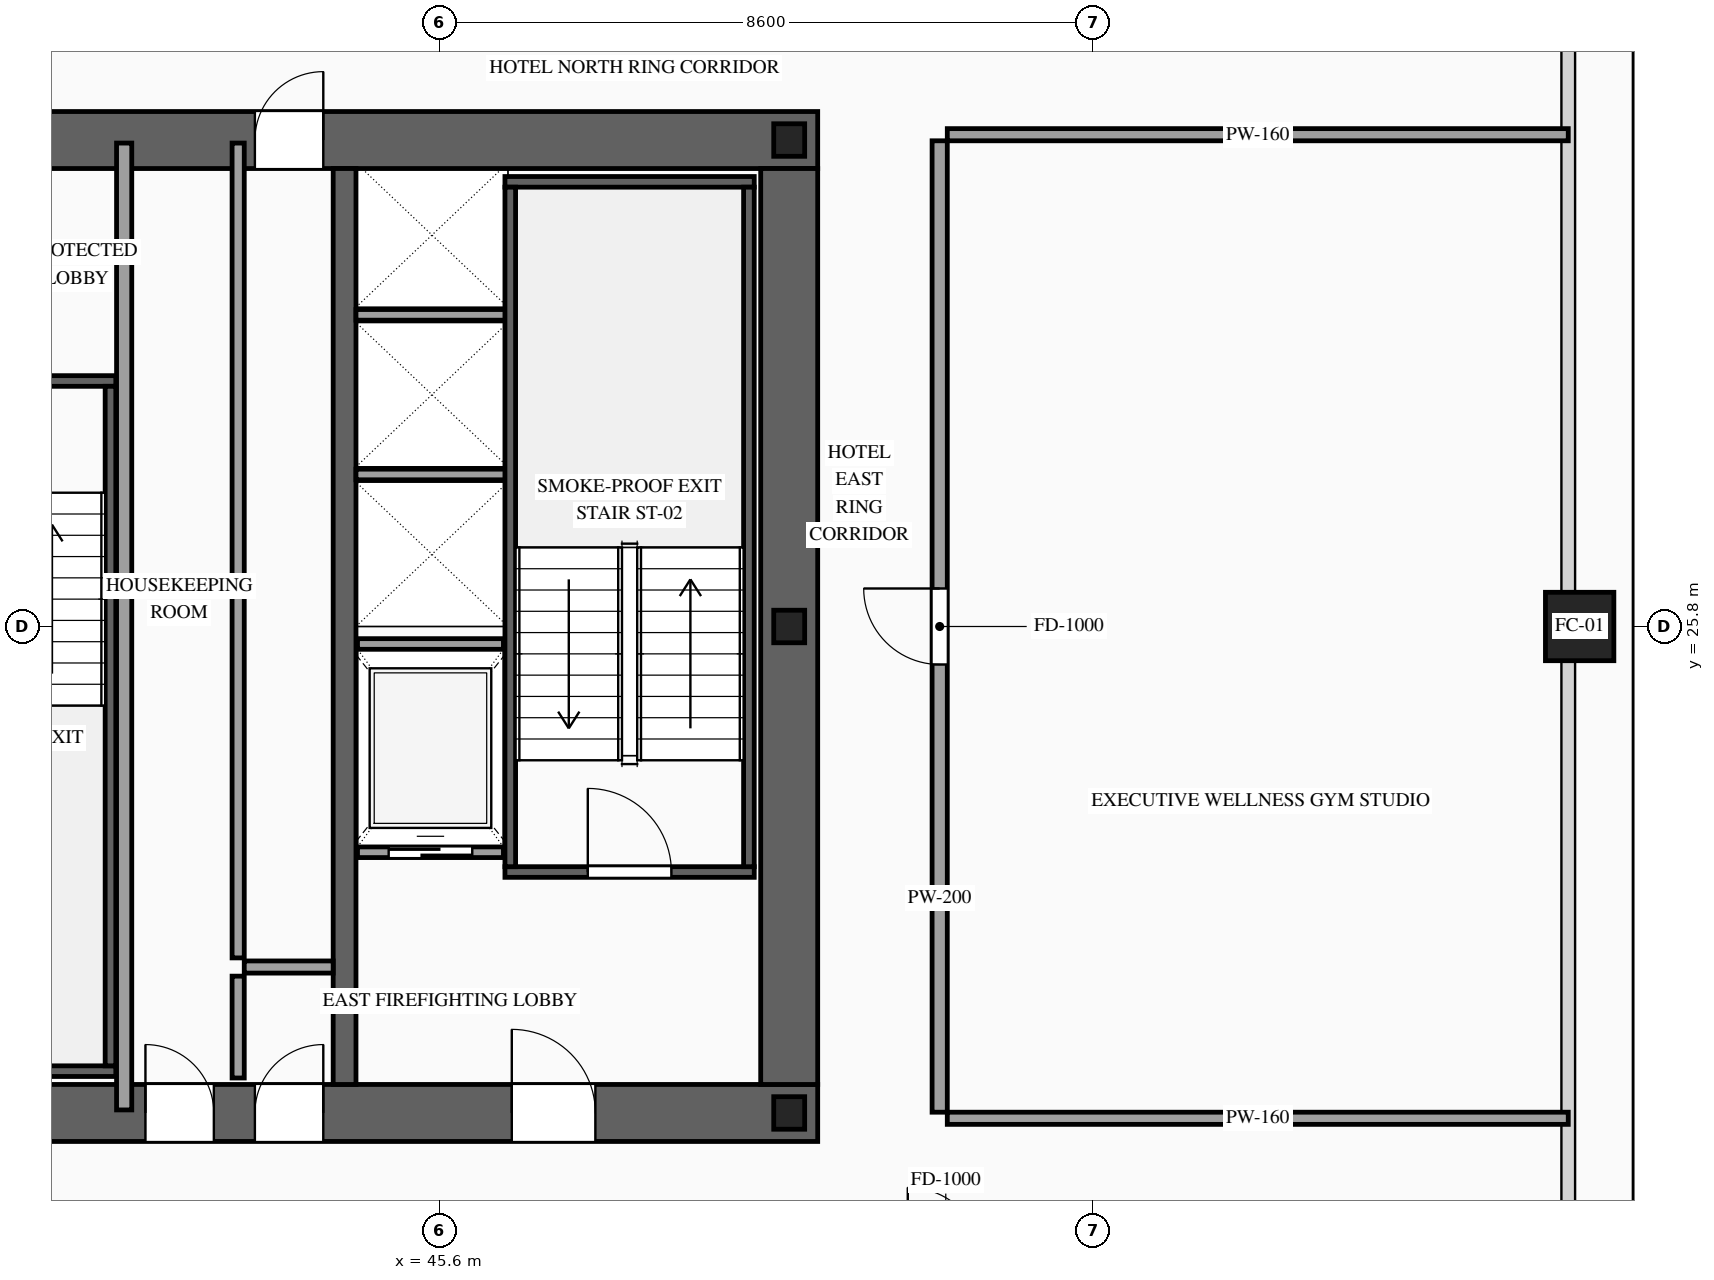
"""IFC4 building model, lengths in metres.
Left out: names, types, materials, properties, quantities, classifications, styles, units other than length and angle.
Written with IfcOpenShell. Run it as: python <this file> out.ifc"""

import sys

from ifc_helpers import new_model, si_unit, direction, frame, frame_2d, origin, origin_2d, place, context, subcontext, project, spatial, rectangle, hollow_rectangle, i_section, extrude, source, transform, mapped, element, fill, save


model = new_model("IFC4")
c1 = context("Model", 3, precision=1e-05, world=origin(), true_north=direction((0.0, 1.0)))
c2 = subcontext(c1, "Body", "Model", "MODEL_VIEW")
j1 = project(units=[si_unit("LENGTHUNIT", "METRE"), si_unit("PLANEANGLEUNIT", "RADIAN")], contexts=[c1])
p1 = place(None, origin())
s1 = spatial("IfcSite", under=j1, at=p1, CompositionType="ELEMENT")
p2 = place(p1, origin())
s2 = spatial("IfcBuilding", under=s1, at=p2, CompositionType="ELEMENT")
p3 = place(p2, frame((0.0, 0.0, 104.6)))
s3 = spatial("IfcBuildingStorey", under=s2, at=p3, CompositionType="ELEMENT", Elevation=104.6)
p4 = place(p3, frame((23.425, 19.4, 0.0), z_axis=(0.0, 0.0, 1.0), x_axis=(1.0, 0.0, 0.0)))
e1 = element("IfcWall", 1, at=p4, inside=s3, PredefinedType="SHEAR", context=c2, shape_type="SweptSolid", body=[
    extrude(rectangle(XDim=27.15, YDim=0.75, at=frame_2d((13.575, 0.0))), origin(), (0.0, 0.0, 1.0), 3.6),
])
p5 = place(p4, frame((2.025, 0.0, 0.0)))
e2 = element("IfcOpeningElement", 2, at=p5, cuts=e1, PredefinedType="OPENING", context=c2, shape_type="SweptSolid", body=[
    extrude(rectangle(XDim=1.1, YDim=2.2, at=frame_2d((0.55, 1.1))), frame((0.0, 0.39, 0.0), z_axis=(0.0, -1.0, 0.0), x_axis=(1.0, 0.0, 0.0)), (0.0, 0.0, 1.0), 0.78),
])
p6 = place(p4, frame((9.925, 0.0, 0.0)))
e3 = element("IfcOpeningElement", 3, at=p6, cuts=e1, PredefinedType="OPENING", context=c2, shape_type="SweptSolid", body=[
    extrude(rectangle(XDim=1.1, YDim=2.2, at=frame_2d((0.55, 1.1))), frame((0.0, 0.39, 0.0), z_axis=(0.0, -1.0, 0.0), x_axis=(1.0, 0.0, 0.0)), (0.0, 0.0, 1.0), 0.78),
])
p7 = place(p4, frame((23.125, 0.0, 0.0)))
e4 = element("IfcOpeningElement", 4, at=p7, cuts=e1, PredefinedType="OPENING", context=c2, shape_type="SweptSolid", body=[
    extrude(rectangle(XDim=1.1, YDim=2.2, at=frame_2d((0.55, 1.1))), frame((0.0, 0.39, 0.0), z_axis=(0.0, -1.0, 0.0), x_axis=(1.0, 0.0, 0.0)), (0.0, 0.0, 1.0), 0.78),
])
p8 = place(p4, frame((19.745, 0.0, 0.0)))
e5 = element("IfcOpeningElement", 5, at=p8, cuts=e1, PredefinedType="OPENING", context=c2, shape_type="SweptSolid", body=[
    extrude(rectangle(XDim=0.9, YDim=2.15, at=frame_2d((0.45, 1.075))), frame((0.0, 0.39, 0.0), z_axis=(0.0, -1.0, 0.0), x_axis=(1.0, 0.0, 0.0)), (0.0, 0.0, 1.0), 0.78),
])
p9 = place(p4, frame((18.305, 0.0, 0.0)))
e6 = element("IfcOpeningElement", 6, at=p9, cuts=e1, PredefinedType="OPENING", context=c2, shape_type="SweptSolid", body=[
    extrude(rectangle(XDim=0.9, YDim=2.15, at=frame_2d((0.45, 1.075))), frame((0.0, 0.39, 0.0), z_axis=(0.0, -1.0, 0.0), x_axis=(1.0, 0.0, 0.0)), (0.0, 0.0, 1.0), 0.78),
])
p10 = place(p3, frame((23.425, 32.2, 0.0), z_axis=(0.0, 0.0, 1.0), x_axis=(1.0, 0.0, 0.0)))
e7 = element("IfcWall", 7, at=p10, inside=s3, PredefinedType="SHEAR", context=c2, shape_type="SweptSolid", body=[
    extrude(rectangle(XDim=27.15, YDim=0.75, at=frame_2d((13.575, 0.0))), origin(), (0.0, 0.0, 1.0), 3.6),
])
p11 = place(p10, frame((4.645, 0.0, 0.0)))
e8 = element("IfcOpeningElement", 8, at=p11, cuts=e7, PredefinedType="OPENING", context=c2, shape_type="SweptSolid", body=[
    extrude(rectangle(XDim=0.9, YDim=2.15, at=frame_2d((0.45, 1.075))), frame((0.0, 0.39, 0.0), z_axis=(0.0, -1.0, 0.0), x_axis=(1.0, 0.0, 0.0)), (0.0, 0.0, 1.0), 0.78),
])
p12 = place(p10, frame((9.925, 0.0, 0.0)))
e9 = element("IfcOpeningElement", 9, at=p12, cuts=e7, PredefinedType="OPENING", context=c2, shape_type="SweptSolid", body=[
    extrude(rectangle(XDim=1.1, YDim=2.2, at=frame_2d((0.55, 1.1))), frame((0.0, 0.39, 0.0), z_axis=(0.0, -1.0, 0.0), x_axis=(1.0, 0.0, 0.0)), (0.0, 0.0, 1.0), 0.78),
])
p13 = place(p10, frame((15.775, 0.0, 0.0)))
e10 = element("IfcOpeningElement", 10, at=p13, cuts=e7, PredefinedType="OPENING", context=c2, shape_type="SweptSolid", body=[
    extrude(rectangle(XDim=1.1, YDim=2.2, at=frame_2d((0.55, 1.1))), frame((0.0, 0.39, 0.0), z_axis=(0.0, -1.0, 0.0), x_axis=(1.0, 0.0, 0.0)), (0.0, 0.0, 1.0), 0.78),
])
p14 = place(p10, frame((19.745, 0.0, 0.0)))
e11 = element("IfcOpeningElement", 11, at=p14, cuts=e7, PredefinedType="OPENING", context=c2, shape_type="SweptSolid", body=[
    extrude(rectangle(XDim=0.9, YDim=2.15, at=frame_2d((0.45, 1.075))), frame((0.0, 0.39, 0.0), z_axis=(0.0, -1.0, 0.0), x_axis=(1.0, 0.0, 0.0)), (0.0, 0.0, 1.0), 0.78),
])
m1 = source(origin(), c2, "Body", "SweptSolid", [
    extrude(rectangle(XDim=12.05, YDim=0.75, at=frame_2d((6.025, 0.0))), origin(), (0.0, 0.0, 1.0), 3.6),
])
p15 = place(p3, frame((50.2, 19.775, 0.0), z_axis=(0.0, 0.0, 1.0), x_axis=(0.0, 1.0, 0.0)))
e12 = element("IfcWall", 12, at=p15, inside=s3, PredefinedType="SHEAR", context=c2, shape_type="MappedRepresentation", body=[
    mapped(m1, transform((0.0, 0.0, 0.0), scale=1.0)),
])
m2 = source(origin(), c2, "Body", "SweptSolid", [
    extrude(rectangle(XDim=12.05, YDim=0.3, at=frame_2d((6.025, 0.0))), origin(), (0.0, 0.0, 1.0), 3.6),
])
p16 = place(p3, frame((44.35, 19.775, 0.0), z_axis=(0.0, 0.0, 1.0), x_axis=(0.0, 1.0, 0.0)))
e13 = element("IfcWall", 13, at=p16, inside=s3, PredefinedType="SOLIDWALL", context=c2, shape_type="MappedRepresentation", body=[
    mapped(m2, transform((0.0, 0.0, 0.0), scale=1.0)),
])
m3 = source(origin(), c2, "Body", "SweptSolid", [
    extrude(i_section(OverallWidth=0.407, OverallDepth=0.428, WebThickness=0.02, FlangeThickness=0.035, at=origin_2d()), origin(), (0.0, 0.0, 1.0), 3.6),
])
for number, where, z_axis, x_axis in (
    (14, (50.2, 19.4, 0.0), (0.0, 0.0, 1.0), (1.0, 0.0, 0.0)),
    (15, (50.2, 25.8, 0.0), (0.0, 0.0, 1.0), (1.0, 0.0, 0.0)),
    (16, (50.2, 32.2, 0.0), (0.0, 0.0, 1.0), (1.0, 0.0, 0.0)),
):
    element("IfcColumn", number, at=place(p3, frame(where, z_axis=z_axis, x_axis=x_axis)), inside=s3, PredefinedType="COLUMN", context=c2, shape_type="MappedRepresentation", body=[
        mapped(m3, transform((0.0, 0.0, 0.0), scale=1.0)),
    ])
m4 = source(origin(), c2, "Body", "SweptSolid", [
    extrude(hollow_rectangle(XDim=0.9, YDim=0.9, WallThickness=0.042, at=origin_2d()), origin(), (0.0, 0.0, 1.0), 3.6),
])
p17 = place(p3, frame((60.6, 25.8, 0.0), z_axis=(0.0, 0.0, 1.0), x_axis=(1.0, 0.0, 0.0)))
e17 = element("IfcColumn", 17, at=p17, inside=s3, PredefinedType="COLUMN", context=c2, shape_type="MappedRepresentation", body=[
    mapped(m4, transform((0.0, 0.0, 0.0), scale=1.0)),
])
p18 = place(p3, frame((44.52, 22.83, 0.0), z_axis=(0.0, 0.0, 1.0), x_axis=(1.0, 0.0, 0.0)))
e18 = element("IfcWall", 18, at=p18, inside=s3, PredefinedType="SOLIDWALL", context=c2, shape_type="SweptSolid", body=[
    extrude(rectangle(XDim=1.92, YDim=0.14, at=frame_2d((0.96, 0.0))), origin(), (0.0, 0.0, 1.0), 3.38),
])
p19 = place(p18, frame((0.41, 0.0, 0.0)))
e19 = element("IfcOpeningElement", 19, at=p19, cuts=e18, PredefinedType="OPENING", context=c2, shape_type="SweptSolid", body=[
    extrude(rectangle(XDim=1.1, YDim=2.2, at=frame_2d((0.55, 1.1))), frame((0.0, 0.085, 0.0), z_axis=(0.0, -1.0, 0.0), x_axis=(1.0, 0.0, 0.0)), (0.0, 0.0, 1.0), 0.17),
])
m5 = source(origin(), c2, "Body", "SweptSolid", [
    extrude(rectangle(XDim=1.92, YDim=0.14, at=frame_2d((0.96, 0.0))), origin(), (0.0, 0.0, 1.0), 3.38),
])
p20 = place(p3, frame((44.52, 25.57, 0.0), z_axis=(0.0, 0.0, 1.0), x_axis=(1.0, 0.0, 0.0)))
e20 = element("IfcWall", 20, at=p20, inside=s3, PredefinedType="SOLIDWALL", context=c2, shape_type="MappedRepresentation", body=[
    mapped(m5, transform((0.0, 0.0, 0.0), scale=1.0)),
])
m6 = source(origin(), c2, "Body", "SweptSolid", [
    extrude(rectangle(XDim=2.0, YDim=0.14, at=frame_2d((1.0, 0.0))), origin(), (0.0, 0.0, 1.0), 3.38),
])
for number, where, z_axis, x_axis in (
    (21, (44.5, 27.8, 0.0), (0.0, 0.0, 1.0), (1.0, 0.0, 0.0)),
    (22, (44.5, 29.9, 0.0), (0.0, 0.0, 1.0), (1.0, 0.0, 0.0)),
):
    element("IfcWall", number, at=place(p3, frame(where, z_axis=z_axis, x_axis=x_axis)), inside=s3, PredefinedType="SOLIDWALL", context=c2, shape_type="MappedRepresentation", body=[
        mapped(m6, transform((0.0, 0.0, 0.0), scale=1.0)),
    ])
p21 = place(p3, frame((46.46, 22.57, 0.0), z_axis=(0.0, 0.0, 1.0), x_axis=(1.0, 0.0, 0.0)))
e23 = element("IfcWall", 23, at=p21, inside=s3, PredefinedType="SOLIDWALL", context=c2, shape_type="SweptSolid", body=[
    extrude(rectangle(XDim=3.28, YDim=0.14, at=frame_2d((1.64, 0.0))), origin(), (0.0, 0.0, 1.0), 3.38),
])
p22 = place(p21, frame((1.09, 0.0, 0.0)))
e24 = element("IfcOpeningElement", 24, at=p22, cuts=e23, PredefinedType="OPENING", context=c2, shape_type="SweptSolid", body=[
    extrude(rectangle(XDim=1.1, YDim=2.2, at=frame_2d((0.55, 1.1))), frame((0.0, 0.085, 0.0), z_axis=(0.0, -1.0, 0.0), x_axis=(1.0, 0.0, 0.0)), (0.0, 0.0, 1.0), 0.17),
])
m7 = source(origin(), c2, "Body", "SweptSolid", [
    extrude(rectangle(XDim=3.28, YDim=0.14, at=frame_2d((1.64, 0.0))), origin(), (0.0, 0.0, 1.0), 3.38),
])
p23 = place(p3, frame((46.46, 31.65, 0.0), z_axis=(0.0, 0.0, 1.0), x_axis=(1.0, 0.0, 0.0)))
e25 = element("IfcWall", 25, at=p23, inside=s3, PredefinedType="SOLIDWALL", context=c2, shape_type="MappedRepresentation", body=[
    mapped(m7, transform((0.0, 0.0, 0.0), scale=1.0)),
])
m8 = source(origin(), c2, "Body", "SweptSolid", [
    extrude(rectangle(XDim=8.94, YDim=0.14, at=frame_2d((4.47, 0.0))), origin(), (0.0, 0.0, 1.0), 3.38),
])
for number, where, z_axis, x_axis in (
    (26, (46.53, 22.64, 0.0), (0.0, 0.0, 1.0), (0.0, 1.0, 0.0)),
    (27, (49.67, 22.64, 0.0), (0.0, 0.0, 1.0), (0.0, 1.0, 0.0)),
):
    element("IfcWall", number, at=place(p3, frame(where, z_axis=z_axis, x_axis=x_axis)), inside=s3, PredefinedType="SOLIDWALL", context=c2, shape_type="MappedRepresentation", body=[
        mapped(m8, transform((0.0, 0.0, 0.0), scale=1.0)),
    ])
p24 = place(p3, frame((38.2, 29.03, 0.0), z_axis=(0.0, 0.0, 1.0), x_axis=(1.0, 0.0, 0.0)))
e28 = element("IfcWall", 28, at=p24, inside=s3, PredefinedType="SOLIDWALL", context=c2, shape_type="SweptSolid", body=[
    extrude(rectangle(XDim=3.14, YDim=0.14, at=frame_2d((1.57, 0.0))), origin(), (0.0, 0.0, 1.0), 3.38),
])
p25 = place(p24, frame((1.02, 0.0, 0.0)))
e29 = element("IfcOpeningElement", 29, at=p25, cuts=e28, PredefinedType="OPENING", context=c2, shape_type="SweptSolid", body=[
    extrude(rectangle(XDim=1.1, YDim=2.2, at=frame_2d((0.55, 1.1))), frame((0.0, 0.085, 0.0), z_axis=(0.0, -1.0, 0.0), x_axis=(1.0, 0.0, 0.0)), (0.0, 0.0, 1.0), 0.17),
])
m9 = source(origin(), c2, "Body", "SweptSolid", [
    extrude(rectangle(XDim=3.14, YDim=0.14, at=frame_2d((1.57, 0.0))), origin(), (0.0, 0.0, 1.0), 3.38),
])
p26 = place(p3, frame((38.2, 19.95, 0.0), z_axis=(0.0, 0.0, 1.0), x_axis=(1.0, 0.0, 0.0)))
e30 = element("IfcWall", 30, at=p26, inside=s3, PredefinedType="SOLIDWALL", context=c2, shape_type="MappedRepresentation", body=[
    mapped(m9, transform((0.0, 0.0, 0.0), scale=1.0)),
])
m10 = source(origin(), c2, "Body", "SweptSolid", [
    extrude(rectangle(XDim=8.94, YDim=0.14, at=frame_2d((4.47, 0.0))), origin(), (0.0, 0.0, 1.0), 3.38),
])
p27 = place(p3, frame((41.27, 20.02, 0.0), z_axis=(0.0, 0.0, 1.0), x_axis=(0.0, 1.0, 0.0)))
e31 = element("IfcWall", 31, at=p27, inside=s3, PredefinedType="SOLIDWALL", context=c2, shape_type="MappedRepresentation", body=[
    mapped(m10, transform((0.0, 0.0, 0.0), scale=1.0)),
])
m11 = source(origin(), c2, "Body", "SweptSolid", [
    extrude(rectangle(XDim=1.34, YDim=0.16, at=frame_2d((0.67, 0.0))), origin(), (0.0, 0.0, 1.0), 3.38),
])
p28 = place(p3, frame((42.95, 19.86, 0.0), z_axis=(0.0, 0.0, 1.0), x_axis=(0.0, 1.0, 0.0)))
e32 = element("IfcWall", 32, at=p28, inside=s3, PredefinedType="PARTITIONING", context=c2, shape_type="MappedRepresentation", body=[
    mapped(m11, transform((0.0, 0.0, 0.0), scale=1.0)),
])
m12 = source(origin(), c2, "Body", "SweptSolid", [
    extrude(rectangle(XDim=1.17, YDim=0.16, at=frame_2d((0.585, 0.0))), origin(), (0.0, 0.0, 1.0), 3.38),
])
p29 = place(p3, frame((43.03, 21.32, 0.0), z_axis=(0.0, 0.0, 1.0), x_axis=(1.0, 0.0, 0.0)))
e33 = element("IfcWall", 33, at=p29, inside=s3, PredefinedType="PARTITIONING", context=c2, shape_type="MappedRepresentation", body=[
    mapped(m12, transform((0.0, 0.0, 0.0), scale=1.0)),
])
m13 = source(origin(), c2, "Body", "SweptSolid", [
    extrude(rectangle(XDim=12.72, YDim=0.2, at=frame_2d((6.36, 0.0))), origin(), (0.0, 0.0, 1.0), 3.38),
])
p30 = place(p3, frame((41.45, 19.44, 0.0), z_axis=(0.0, 0.0, 1.0), x_axis=(0.0, 1.0, 0.0)))
e34 = element("IfcWall", 34, at=p30, inside=s3, PredefinedType="PARTITIONING", context=c2, shape_type="MappedRepresentation", body=[
    mapped(m13, transform((0.0, 0.0, 0.0), scale=1.0)),
])
m14 = source(origin(), c2, "Body", "SweptSolid", [
    extrude(rectangle(XDim=10.72, YDim=0.16, at=frame_2d((5.36, 0.0))), origin(), (0.0, 0.0, 1.0), 3.38),
])
p31 = place(p3, frame((42.95, 21.44, 0.0), z_axis=(0.0, 0.0, 1.0), x_axis=(0.0, 1.0, 0.0)))
e35 = element("IfcWall", 35, at=p31, inside=s3, PredefinedType="PARTITIONING", context=c2, shape_type="MappedRepresentation", body=[
    mapped(m14, transform((0.0, 0.0, 0.0), scale=1.0)),
])
p32 = place(p3, frame((52.18, 19.41, 0.0), z_axis=(0.0, 0.0, 1.0), x_axis=(0.0, 1.0, 0.0)))
e36 = element("IfcWall", 36, at=p32, inside=s3, PredefinedType="PARTITIONING", context=c2, shape_type="SweptSolid", body=[
    extrude(rectangle(XDim=12.78, YDim=0.2, at=frame_2d((6.39, 0.0))), origin(), (0.0, 0.0, 1.0), 3.38),
])
p33 = place(p32, frame((5.89, 0.0, 0.0)))
e37 = element("IfcOpeningElement", 37, at=p33, cuts=e36, PredefinedType="OPENING", context=c2, shape_type="SweptSolid", body=[
    extrude(rectangle(XDim=1.0, YDim=2.2, at=frame_2d((0.5, 1.1))), frame((0.0, 0.115, 0.0), z_axis=(0.0, -1.0, 0.0), x_axis=(1.0, 0.0, 0.0)), (0.0, 0.0, 1.0), 0.23),
])
m15 = source(origin(), c2, "Body", "SweptSolid", [
    extrude(rectangle(XDim=8.17, YDim=0.16, at=frame_2d((4.085, 0.0))), origin(), (0.0, 0.0, 1.0), 2.875),
])
for number, where, z_axis, x_axis in (
    (38, (52.28, 19.33, 0.0), (0.0, 0.0, 1.0), (1.0, 0.0, 0.0)),
    (39, (52.28, 32.27, 0.0), (0.0, 0.0, 1.0), (1.0, 0.0, 0.0)),
):
    element("IfcWall", number, at=place(p3, frame(where, z_axis=z_axis, x_axis=x_axis)), inside=s3, PredefinedType="PARTITIONING", context=c2, shape_type="MappedRepresentation", body=[
        mapped(m15, transform((0.0, 0.0, 0.0), scale=1.0)),
    ])
m16 = source(origin(), c2, "Body", "SweptSolid", [
    extrude(rectangle(XDim=1.1, YDim=2.2, at=frame_2d((0.55, 1.1))), frame((0.0, 0.025, 0.0), z_axis=(0.0, -1.0, 0.0), x_axis=(1.0, 0.0, 0.0)), (0.0, 0.0, 1.0), 0.05),
])
p34 = place(p19, origin())
e40 = element("IfcDoor", 40, at=p34, inside=s3, OperationType="SLIDING_TO_RIGHT", PredefinedType="DOOR", context=c2, shape_type="MappedRepresentation", body=[
    mapped(m16, transform((0.0, 0.0, 0.0), scale=1.0)),
])
fill(e19, e40)
m17 = source(origin(), c2, "Body", "SweptSolid", [
    extrude(rectangle(XDim=1.1, YDim=2.2, at=frame_2d((0.55, 1.1))), frame((0.0, 0.025, 0.0), z_axis=(0.0, -1.0, 0.0), x_axis=(1.0, 0.0, 0.0)), (0.0, 0.0, 1.0), 0.05),
])
p35 = place(p22, origin())
e41 = element("IfcDoor", 41, at=p35, inside=s3, OperationType="SINGLE_SWING_LEFT", PredefinedType="DOOR", context=c2, shape_type="MappedRepresentation", body=[
    mapped(m17, transform((0.0, 0.0, 0.0), scale=1.0)),
])
fill(e24, e41)
p36 = place(p7, origin())
e42 = element("IfcDoor", 42, at=p36, inside=s3, OperationType="SINGLE_SWING_LEFT", PredefinedType="DOOR", context=c2, shape_type="MappedRepresentation", body=[
    mapped(m17, transform((0.0, 0.0, 0.0), scale=1.0)),
])
fill(e4, e42)
m18 = source(origin(), c2, "Body", "SweptSolid", [
    extrude(rectangle(XDim=0.9, YDim=2.15, at=frame_2d((0.45, 1.075))), frame((0.0, 0.025, 0.0), z_axis=(0.0, -1.0, 0.0), x_axis=(1.0, 0.0, 0.0)), (0.0, 0.0, 1.0), 0.05),
])
p37 = place(p8, origin())
e43 = element("IfcDoor", 43, at=p37, inside=s3, OperationType="SINGLE_SWING_RIGHT", PredefinedType="DOOR", context=c2, shape_type="MappedRepresentation", body=[
    mapped(m18, transform((0.0, 0.0, 0.0), scale=1.0)),
])
fill(e5, e43)
p38 = place(p9, origin())
e44 = element("IfcDoor", 44, at=p38, inside=s3, OperationType="SINGLE_SWING_LEFT", PredefinedType="DOOR", context=c2, shape_type="MappedRepresentation", body=[
    mapped(m18, transform((0.0, 0.0, 0.0), scale=1.0)),
])
fill(e6, e44)
p39 = place(p14, origin())
e45 = element("IfcDoor", 45, at=p39, inside=s3, OperationType="SINGLE_SWING_RIGHT", PredefinedType="DOOR", context=c2, shape_type="MappedRepresentation", body=[
    mapped(m18, transform((0.0, 0.0, 0.0), scale=1.0)),
])
fill(e11, e45)
m19 = source(origin(), c2, "Body", "SweptSolid", [
    extrude(rectangle(XDim=1.0, YDim=2.2, at=frame_2d((0.5, 1.1))), frame((0.0, 0.025, 0.0), z_axis=(0.0, -1.0, 0.0), x_axis=(1.0, 0.0, 0.0)), (0.0, 0.0, 1.0), 0.05),
])
p40 = place(p33, origin())
e46 = element("IfcDoor", 46, at=p40, inside=s3, OperationType="SINGLE_SWING_RIGHT", PredefinedType="DOOR", context=c2, shape_type="MappedRepresentation", body=[
    mapped(m19, transform((0.0, 0.0, 0.0), scale=1.0)),
])
fill(e37, e46)
save(model, sys.argv[1])
